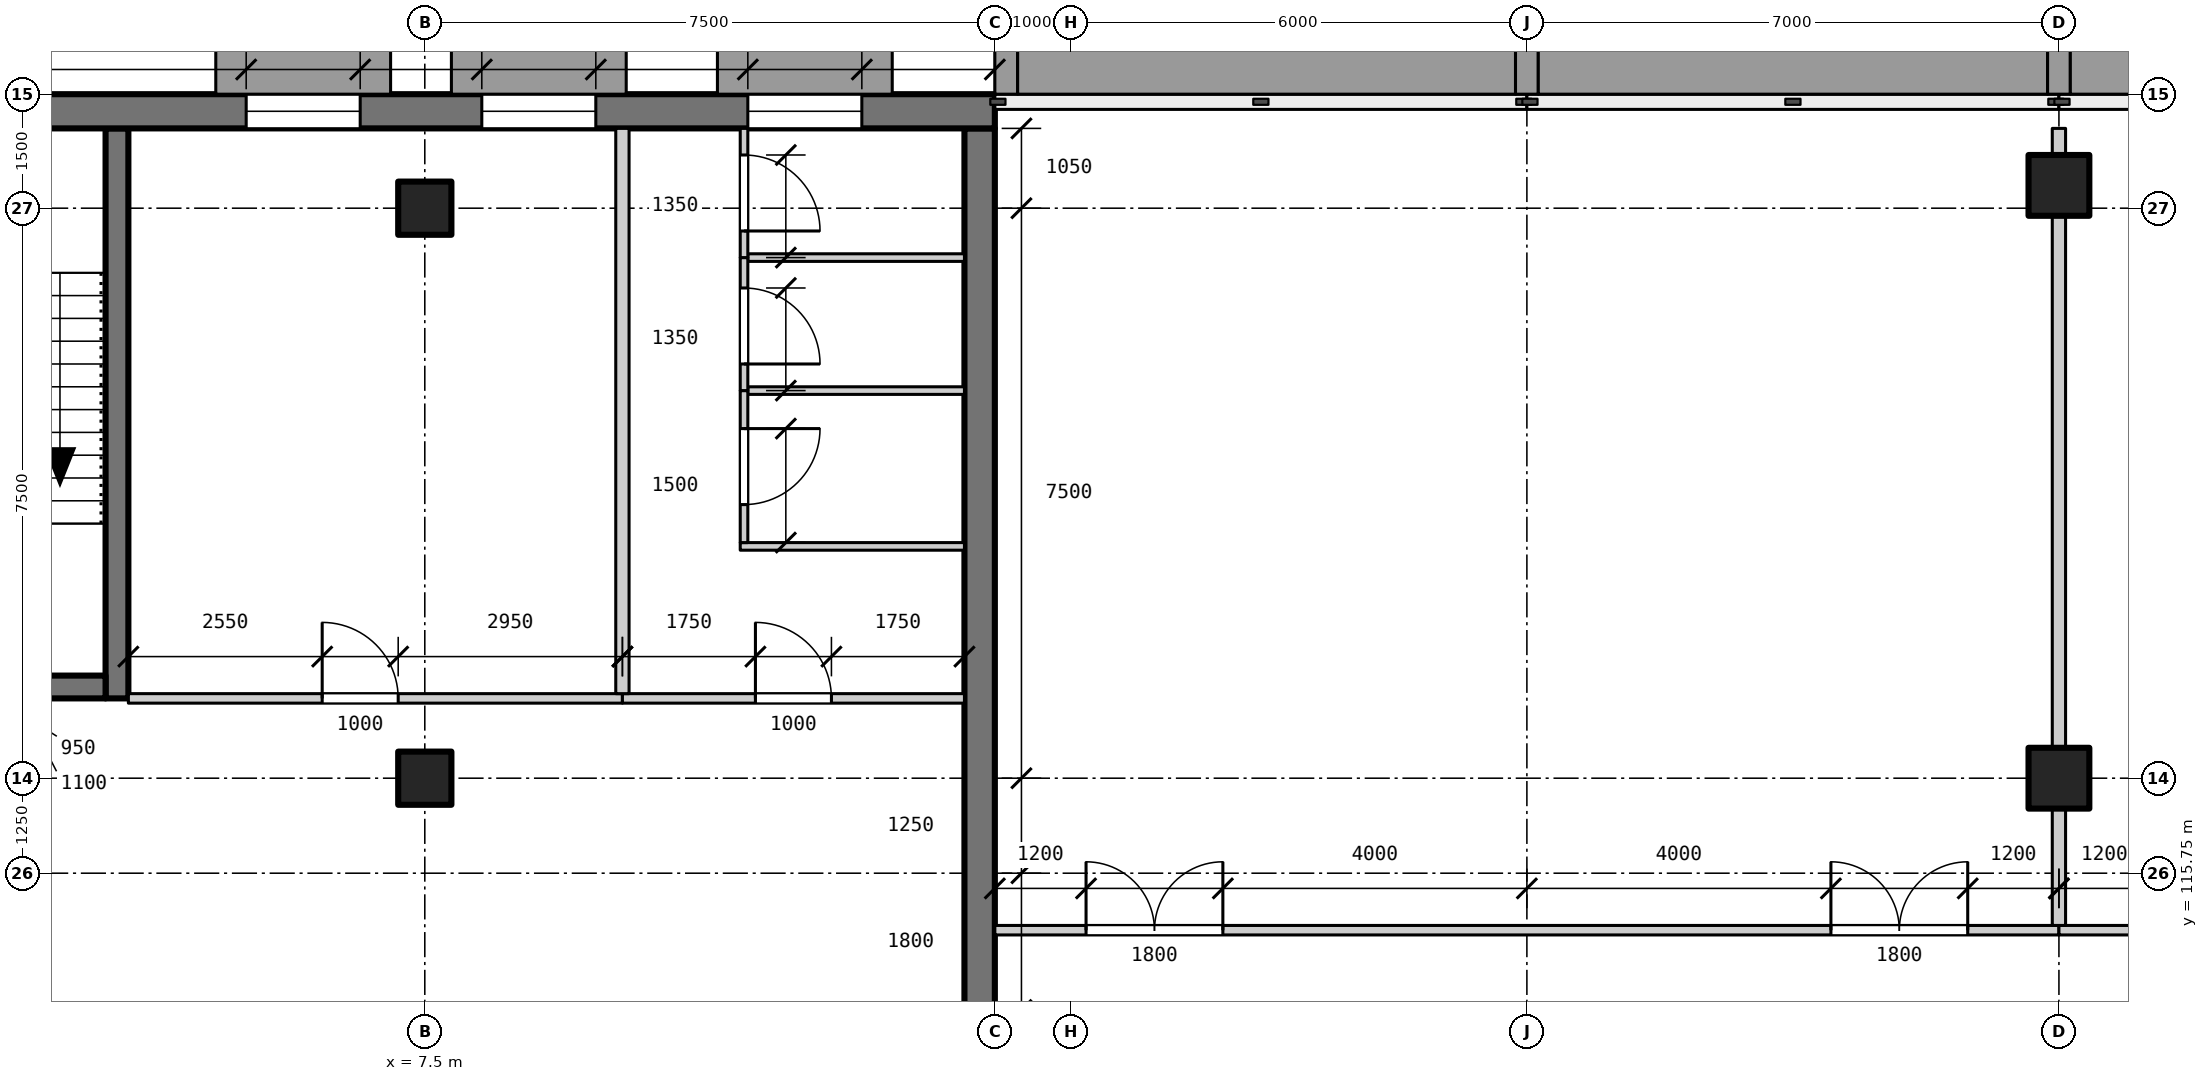
"""IFC4 building model, lengths in metres.
Left out: names, types, materials, properties, quantities, classifications, styles, units other than length and angle.
Written with IfcOpenShell. Run it as: python <this file> out.ifc"""

import sys

from ifc_helpers import new_model, si_unit, direction, frame, frame_2d, origin, origin_2d, place, context, subcontext, project, spatial, rectangle, extrude, element, fill, save


model = new_model("IFC4")
c1 = context("Model", 3, precision=1e-05, world=origin(), true_north=direction((0.0, 1.0)))
c2 = subcontext(c1, "Body", "Model", "MODEL_VIEW")
j1 = project(units=[si_unit("LENGTHUNIT", "METRE"), si_unit("PLANEANGLEUNIT", "RADIAN")], contexts=[c1])
p1 = place(None, origin())
s1 = spatial("IfcSite", under=j1, at=p1, CompositionType="ELEMENT")
p2 = place(p1, origin())
s2 = spatial("IfcBuilding", under=s1, at=p2, CompositionType="ELEMENT")
p3 = place(p2, frame((0.0, 0.0, 6.0)))
s3 = spatial("IfcBuildingStorey", under=s2, at=p3, CompositionType="ELEMENT", Elevation=6.0)
for number, where, z_axis, x_axis in (
    (1, (7.5, 117.0, 0.0), (0.0, 0.0, 1.0), (1.0, 0.0, 0.0)),
    (2, (7.5, 124.5, 0.0), (0.0, 0.0, 1.0), (1.0, 0.0, 0.0)),
):
    element("IfcColumn", number, at=place(p3, frame(where, z_axis=z_axis, x_axis=x_axis)), inside=s3, PredefinedType="COLUMN", context=c2, shape_type="SweptSolid", body=[
        extrude(rectangle(XDim=0.7, YDim=0.7, at=origin_2d()), origin(), (0.0, 0.0, 1.0), 3.9),
    ])
for number, where, z_axis, x_axis in (
    (3, (29.0, 117.0, 0.0), (0.0, 0.0, 1.0), (1.0, 0.0, 0.0)),
    (4, (29.0, 124.8, 0.0), (0.0, 0.0, 1.0), (1.0, 0.0, 0.0)),
):
    element("IfcColumn", number, at=place(p3, frame(where, z_axis=z_axis, x_axis=x_axis)), inside=s3, PredefinedType="COLUMN", context=c2, shape_type="SweptSolid", body=[
        extrude(rectangle(XDim=0.8, YDim=0.8, at=origin_2d()), origin(), (0.0, 0.0, 1.0), 3.9),
    ])
p4 = place(p3, frame((14.8, 99.0, 0.0), z_axis=(0.0, 0.0, 1.0), x_axis=(0.0, 1.0, 0.0)))
e5 = element("IfcWall", 5, at=p4, inside=s3, PredefinedType="SHEAR", context=c2, shape_type="SweptSolid", body=[
    extrude(rectangle(XDim=26.55, YDim=0.4, at=frame_2d((13.275, 0.0))), origin(), (0.0, 0.0, 1.0), 4.2),
])
p5 = place(p4, frame((13.55, 0.0, 0.0)))
e6 = element("IfcOpeningElement", 6, at=p5, cuts=e5, PredefinedType="OPENING", context=c2, shape_type="SweptSolid", body=[
    extrude(rectangle(XDim=1.4, YDim=2.4, at=frame_2d((0.7, 1.2))), frame((0.0, 0.21, 0.0), z_axis=(0.0, -1.0, 0.0), x_axis=(1.0, 0.0, 0.0)), (0.0, 0.0, 1.0), 0.42),
])
p6 = place(p3, frame((3.45, 118.05, 0.0), z_axis=(0.0, 0.0, 1.0), x_axis=(0.0, 1.0, 0.0)))
e7 = element("IfcWall", 7, at=p6, inside=s3, PredefinedType="SHEAR", context=c2, shape_type="SweptSolid", body=[
    extrude(rectangle(XDim=7.5, YDim=0.3, at=frame_2d((3.75, 0.0))), origin(), (0.0, 0.0, 1.0), 4.2),
])
p7 = place(p3, frame((0.3, 118.2, 0.0), z_axis=(0.0, 0.0, 1.0), x_axis=(1.0, 0.0, 0.0)))
e8 = element("IfcWall", 8, at=p7, inside=s3, PredefinedType="SHEAR", context=c2, shape_type="SweptSolid", body=[
    extrude(rectangle(XDim=3.0, YDim=0.3, at=frame_2d((1.5, 0.0))), origin(), (0.0, 0.0, 1.0), 4.2),
])
p8 = place(p7, frame((0.95, 0.0, 0.0)))
e9 = element("IfcOpeningElement", 9, at=p8, cuts=e8, PredefinedType="OPENING", context=c2, shape_type="SweptSolid", body=[
    extrude(rectangle(XDim=1.1, YDim=2.1, at=frame_2d((0.55, 1.05))), frame((0.0, 0.16, 0.0), z_axis=(0.0, -1.0, 0.0), x_axis=(1.0, 0.0, 0.0)), (0.0, 0.0, 1.0), 0.32),
])
p9 = place(p3, frame((0.3, 125.775, 0.0), z_axis=(0.0, 0.0, 1.0), x_axis=(1.0, 0.0, 0.0)))
e10 = element("IfcWall", 10, at=p9, inside=s3, PredefinedType="SOLIDWALL", context=c2, shape_type="SweptSolid", body=[
    extrude(rectangle(XDim=14.7, YDim=0.45, at=frame_2d((7.35, 0.0))), origin(), (0.0, 0.0, 1.0), 3.9),
])
p10 = place(p9, frame((4.85, 0.0, 0.8)))
e11 = element("IfcOpeningElement", 11, at=p10, cuts=e10, PredefinedType="OPENING", context=c2, shape_type="SweptSolid", body=[
    extrude(rectangle(XDim=1.5, YDim=2.2, at=frame_2d((0.75, 1.1))), frame((0.0, 0.235, 0.0), z_axis=(0.0, -1.0, 0.0), x_axis=(1.0, 0.0, 0.0)), (0.0, 0.0, 1.0), 0.47),
])
p11 = place(p9, frame((7.95, 0.0, 0.8)))
e12 = element("IfcOpeningElement", 12, at=p11, cuts=e10, PredefinedType="OPENING", context=c2, shape_type="SweptSolid", body=[
    extrude(rectangle(XDim=1.5, YDim=2.2, at=frame_2d((0.75, 1.1))), frame((0.0, 0.235, 0.0), z_axis=(0.0, -1.0, 0.0), x_axis=(1.0, 0.0, 0.0)), (0.0, 0.0, 1.0), 0.47),
])
p12 = place(p9, frame((11.45, 0.0, 0.8)))
e13 = element("IfcOpeningElement", 13, at=p12, cuts=e10, PredefinedType="OPENING", context=c2, shape_type="SweptSolid", body=[
    extrude(rectangle(XDim=1.5, YDim=2.2, at=frame_2d((0.75, 1.1))), frame((0.0, 0.235, 0.0), z_axis=(0.0, -1.0, 0.0), x_axis=(1.0, 0.0, 0.0)), (0.0, 0.0, 1.0), 0.47),
])
p13 = place(p3, frame((15.0, 115.0, 0.0), z_axis=(0.0, 0.0, 1.0), x_axis=(1.0, 0.0, 0.0)))
e14 = element("IfcWall", 14, at=p13, inside=s3, PredefinedType="PARTITIONING", context=c2, shape_type="SweptSolid", body=[
    extrude(rectangle(XDim=14.0, YDim=0.125, at=frame_2d((7.0, 0.0))), origin(), (0.0, 0.0, 1.0), 3.9),
])
p14 = place(p13, frame((1.2, 0.0, 0.0)))
e15 = element("IfcOpeningElement", 15, at=p14, cuts=e14, PredefinedType="OPENING", context=c2, shape_type="SweptSolid", body=[
    extrude(rectangle(XDim=1.8, YDim=2.1, at=frame_2d((0.9, 1.05))), frame((0.0, 0.073, 0.0), z_axis=(0.0, -1.0, 0.0), x_axis=(1.0, 0.0, 0.0)), (0.0, 0.0, 1.0), 0.145),
])
p15 = place(p13, frame((11.0, 0.0, 0.0)))
e16 = element("IfcOpeningElement", 16, at=p15, cuts=e14, PredefinedType="OPENING", context=c2, shape_type="SweptSolid", body=[
    extrude(rectangle(XDim=1.8, YDim=2.1, at=frame_2d((0.9, 1.05))), frame((0.0, 0.073, 0.0), z_axis=(0.0, -1.0, 0.0), x_axis=(1.0, 0.0, 0.0)), (0.0, 0.0, 1.0), 0.145),
])
p16 = place(p3, frame((29.0, 115.0, 0.0), z_axis=(0.0, 0.0, 1.0), x_axis=(1.0, 0.0, 0.0)))
e17 = element("IfcWall", 17, at=p16, inside=s3, PredefinedType="PARTITIONING", context=c2, shape_type="SweptSolid", body=[
    extrude(rectangle(XDim=14.0, YDim=0.125, at=frame_2d((7.0, 0.0))), origin(), (0.0, 0.0, 1.0), 3.9),
])
p17 = place(p16, frame((1.2, 0.0, 0.0)))
e18 = element("IfcOpeningElement", 18, at=p17, cuts=e17, PredefinedType="OPENING", context=c2, shape_type="SweptSolid", body=[
    extrude(rectangle(XDim=1.8, YDim=2.1, at=frame_2d((0.9, 1.05))), frame((0.0, 0.073, 0.0), z_axis=(0.0, -1.0, 0.0), x_axis=(1.0, 0.0, 0.0)), (0.0, 0.0, 1.0), 0.145),
])
p18 = place(p16, frame((11.0, 0.0, 0.0)))
e19 = element("IfcOpeningElement", 19, at=p18, cuts=e17, PredefinedType="OPENING", context=c2, shape_type="SweptSolid", body=[
    extrude(rectangle(XDim=1.8, YDim=2.1, at=frame_2d((0.9, 1.05))), frame((0.0, 0.073, 0.0), z_axis=(0.0, -1.0, 0.0), x_axis=(1.0, 0.0, 0.0)), (0.0, 0.0, 1.0), 0.145),
])
p19 = place(p3, frame((3.6, 118.05, 0.0), z_axis=(0.0, 0.0, 1.0), x_axis=(1.0, 0.0, 0.0)))
e20 = element("IfcWall", 20, at=p19, inside=s3, PredefinedType="PARTITIONING", context=c2, shape_type="SweptSolid", body=[
    extrude(rectangle(XDim=6.5, YDim=0.125, at=frame_2d((3.25, 0.0))), origin(), (0.0, 0.0, 1.0), 3.9),
])
p20 = place(p19, frame((2.55, 0.0, 0.0)))
e21 = element("IfcOpeningElement", 21, at=p20, cuts=e20, PredefinedType="OPENING", context=c2, shape_type="SweptSolid", body=[
    extrude(rectangle(XDim=1.0, YDim=2.1, at=frame_2d((0.5, 1.05))), frame((0.0, 0.073, 0.0), z_axis=(0.0, -1.0, 0.0), x_axis=(1.0, 0.0, 0.0)), (0.0, 0.0, 1.0), 0.145),
])
p21 = place(p3, frame((10.1, 118.05, 0.0), z_axis=(0.0, 0.0, 1.0), x_axis=(1.0, 0.0, 0.0)))
e22 = element("IfcWall", 22, at=p21, inside=s3, PredefinedType="PARTITIONING", context=c2, shape_type="SweptSolid", body=[
    extrude(rectangle(XDim=4.5, YDim=0.125, at=frame_2d((2.25, 0.0))), origin(), (0.0, 0.0, 1.0), 3.9),
])
p22 = place(p21, frame((1.75, 0.0, 0.0)))
e23 = element("IfcOpeningElement", 23, at=p22, cuts=e22, PredefinedType="OPENING", context=c2, shape_type="SweptSolid", body=[
    extrude(rectangle(XDim=1.0, YDim=2.1, at=frame_2d((0.5, 1.05))), frame((0.0, 0.073, 0.0), z_axis=(0.0, -1.0, 0.0), x_axis=(1.0, 0.0, 0.0)), (0.0, 0.0, 1.0), 0.145),
])
p23 = place(p3, frame((11.65, 120.05, 0.0), z_axis=(0.0, 0.0, 1.0), x_axis=(1.0, 0.0, 0.0)))
e24 = element("IfcWall", 24, at=p23, inside=s3, PredefinedType="PARTITIONING", context=c2, shape_type="SweptSolid", body=[
    extrude(rectangle(XDim=2.95, YDim=0.1, at=frame_2d((1.475, 0.0))), origin(), (0.0, 0.0, 1.0), 3.9),
])
for number, where, z_axis, x_axis in (
    (25, (11.75, 122.1, 0.0), (0.0, 0.0, 1.0), (1.0, 0.0, 0.0)),
    (26, (11.75, 123.85, 0.0), (0.0, 0.0, 1.0), (1.0, 0.0, 0.0)),
):
    element("IfcWall", number, at=place(p3, frame(where, z_axis=z_axis, x_axis=x_axis)), inside=s3, PredefinedType="PARTITIONING", context=c2, shape_type="SweptSolid", body=[
        extrude(rectangle(XDim=2.85, YDim=0.1, at=frame_2d((1.425, 0.0))), origin(), (0.0, 0.0, 1.0), 3.9),
    ])
p24 = place(p3, frame((10.1, 118.113, 0.0), z_axis=(0.0, 0.0, 1.0), x_axis=(0.0, 1.0, 0.0)))
e27 = element("IfcWall", 27, at=p24, inside=s3, PredefinedType="PARTITIONING", context=c2, shape_type="SweptSolid", body=[
    extrude(rectangle(XDim=7.438, YDim=0.175, at=frame_2d((3.719, 0.0))), origin(), (0.0, 0.0, 1.0), 3.9),
])
p25 = place(p3, frame((11.7, 120.1, 0.0), z_axis=(0.0, 0.0, 1.0), x_axis=(0.0, 1.0, 0.0)))
e28 = element("IfcWall", 28, at=p25, inside=s3, PredefinedType="PARTITIONING", context=c2, shape_type="SweptSolid", body=[
    extrude(rectangle(XDim=2.0, YDim=0.1, at=frame_2d((1.0, 0.0))), origin(), (0.0, 0.0, 1.0), 3.9),
])
p26 = place(p25, frame((0.5, 0.0, 0.0)))
e29 = element("IfcOpeningElement", 29, at=p26, cuts=e28, PredefinedType="OPENING", context=c2, shape_type="SweptSolid", body=[
    extrude(rectangle(XDim=1.0, YDim=2.1, at=frame_2d((0.5, 1.05))), frame((0.0, 0.06, 0.0), z_axis=(0.0, -1.0, 0.0), x_axis=(1.0, 0.0, 0.0)), (0.0, 0.0, 1.0), 0.12),
])
p27 = place(p3, frame((11.7, 122.1, 0.0), z_axis=(0.0, 0.0, 1.0), x_axis=(0.0, 1.0, 0.0)))
e30 = element("IfcWall", 30, at=p27, inside=s3, PredefinedType="PARTITIONING", context=c2, shape_type="SweptSolid", body=[
    extrude(rectangle(XDim=1.75, YDim=0.1, at=frame_2d((0.875, 0.0))), origin(), (0.0, 0.0, 1.0), 3.9),
])
p28 = place(p27, frame((0.35, 0.0, 0.0)))
e31 = element("IfcOpeningElement", 31, at=p28, cuts=e30, PredefinedType="OPENING", context=c2, shape_type="SweptSolid", body=[
    extrude(rectangle(XDim=1.0, YDim=2.1, at=frame_2d((0.5, 1.05))), frame((0.0, 0.06, 0.0), z_axis=(0.0, -1.0, 0.0), x_axis=(1.0, 0.0, 0.0)), (0.0, 0.0, 1.0), 0.12),
])
p29 = place(p3, frame((11.7, 123.85, 0.0), z_axis=(0.0, 0.0, 1.0), x_axis=(0.0, 1.0, 0.0)))
e32 = element("IfcWall", 32, at=p29, inside=s3, PredefinedType="PARTITIONING", context=c2, shape_type="SweptSolid", body=[
    extrude(rectangle(XDim=1.7, YDim=0.1, at=frame_2d((0.85, 0.0))), origin(), (0.0, 0.0, 1.0), 3.9),
])
p30 = place(p29, frame((0.35, 0.0, 0.0)))
e33 = element("IfcOpeningElement", 33, at=p30, cuts=e32, PredefinedType="OPENING", context=c2, shape_type="SweptSolid", body=[
    extrude(rectangle(XDim=1.0, YDim=2.1, at=frame_2d((0.5, 1.05))), frame((0.0, 0.06, 0.0), z_axis=(0.0, -1.0, 0.0), x_axis=(1.0, 0.0, 0.0)), (0.0, 0.0, 1.0), 0.12),
])
p31 = place(p3, frame((29.0, 115.062, 0.0), z_axis=(0.0, 0.0, 1.0), x_axis=(0.0, 1.0, 0.0)))
e34 = element("IfcWall", 34, at=p31, inside=s3, PredefinedType="PARTITIONING", context=c2, shape_type="SweptSolid", body=[
    extrude(rectangle(XDim=1.538, YDim=0.175, at=frame_2d((0.769, 0.0))), origin(), (0.0, 0.0, 1.0), 2.9),
])
p32 = place(p3, frame((29.0, 117.4, 0.0), z_axis=(0.0, 0.0, 1.0), x_axis=(0.0, 1.0, 0.0)))
e35 = element("IfcWall", 35, at=p32, inside=s3, PredefinedType="PARTITIONING", context=c2, shape_type="SweptSolid", body=[
    extrude(rectangle(XDim=7.0, YDim=0.175, at=frame_2d((3.5, 0.0))), origin(), (0.0, 0.0, 1.0), 2.9),
])
p33 = place(p3, frame((29.0, 125.2, 0.0), z_axis=(0.0, 0.0, 1.0), x_axis=(0.0, 1.0, 0.0)))
e36 = element("IfcWall", 36, at=p33, inside=s3, PredefinedType="PARTITIONING", context=c2, shape_type="SweptSolid", body=[
    extrude(rectangle(XDim=0.35, YDim=0.175, at=frame_2d((0.175, 0.0))), origin(), (0.0, 0.0, 1.0), 3.9),
])
p34 = place(p10, origin())
e37 = element("IfcWindow", 37, at=p34, inside=s3, PartitioningType="SINGLE_PANEL", PredefinedType="WINDOW", context=c2, shape_type="SweptSolid", body=[
    extrude(rectangle(XDim=1.5, YDim=2.2, at=frame_2d((0.75, 1.1))), frame((0.0, -0.075, 0.0), z_axis=(0.0, -1.0, 0.0), x_axis=(1.0, 0.0, 0.0)), (0.0, 0.0, 1.0), 0.06),
])
fill(e11, e37)
p35 = place(p11, origin())
e38 = element("IfcWindow", 38, at=p35, inside=s3, PartitioningType="SINGLE_PANEL", PredefinedType="WINDOW", context=c2, shape_type="SweptSolid", body=[
    extrude(rectangle(XDim=1.5, YDim=2.2, at=frame_2d((0.75, 1.1))), frame((0.0, -0.075, 0.0), z_axis=(0.0, -1.0, 0.0), x_axis=(1.0, 0.0, 0.0)), (0.0, 0.0, 1.0), 0.06),
])
fill(e12, e38)
p36 = place(p12, origin())
e39 = element("IfcWindow", 39, at=p36, inside=s3, PartitioningType="SINGLE_PANEL", PredefinedType="WINDOW", context=c2, shape_type="SweptSolid", body=[
    extrude(rectangle(XDim=1.5, YDim=2.2, at=frame_2d((0.75, 1.1))), frame((0.0, -0.075, 0.0), z_axis=(0.0, -1.0, 0.0), x_axis=(1.0, 0.0, 0.0)), (0.0, 0.0, 1.0), 0.06),
])
fill(e13, e39)
p37 = place(p14, origin())
e40 = element("IfcDoor", 40, at=p37, inside=s3, OperationType="DOUBLE_DOOR_SINGLE_SWING", PredefinedType="DOOR", context=c2, shape_type="SweptSolid", body=[
    extrude(rectangle(XDim=1.8, YDim=2.1, at=frame_2d((0.9, 1.05))), frame((0.0, 0.025, 0.0), z_axis=(0.0, -1.0, 0.0), x_axis=(1.0, 0.0, 0.0)), (0.0, 0.0, 1.0), 0.05),
])
fill(e15, e40)
p38 = place(p15, origin())
e41 = element("IfcDoor", 41, at=p38, inside=s3, OperationType="DOUBLE_DOOR_SINGLE_SWING", PredefinedType="DOOR", context=c2, shape_type="SweptSolid", body=[
    extrude(rectangle(XDim=1.8, YDim=2.1, at=frame_2d((0.9, 1.05))), frame((0.0, 0.025, 0.0), z_axis=(0.0, -1.0, 0.0), x_axis=(1.0, 0.0, 0.0)), (0.0, 0.0, 1.0), 0.05),
])
fill(e16, e41)
p39 = place(p20, origin())
e42 = element("IfcDoor", 42, at=p39, inside=s3, OperationType="SINGLE_SWING_LEFT", PredefinedType="DOOR", context=c2, shape_type="SweptSolid", body=[
    extrude(rectangle(XDim=1.0, YDim=2.1, at=frame_2d((0.5, 1.05))), frame((0.0, 0.025, 0.0), z_axis=(0.0, -1.0, 0.0), x_axis=(1.0, 0.0, 0.0)), (0.0, 0.0, 1.0), 0.05),
])
fill(e21, e42)
p40 = place(p22, origin())
e43 = element("IfcDoor", 43, at=p40, inside=s3, OperationType="SINGLE_SWING_LEFT", PredefinedType="DOOR", context=c2, shape_type="SweptSolid", body=[
    extrude(rectangle(XDim=1.0, YDim=2.1, at=frame_2d((0.5, 1.05))), frame((0.0, 0.025, 0.0), z_axis=(0.0, -1.0, 0.0), x_axis=(1.0, 0.0, 0.0)), (0.0, 0.0, 1.0), 0.05),
])
fill(e23, e43)
p41 = place(p26, frame((1.0, 0.0, 0.0), z_axis=(0.0, 0.0, 1.0), x_axis=(-1.0, 0.0, 0.0)))
e44 = element("IfcDoor", 44, at=p41, inside=s3, OperationType="SINGLE_SWING_LEFT", PredefinedType="DOOR", context=c2, shape_type="SweptSolid", body=[
    extrude(rectangle(XDim=1.0, YDim=2.1, at=frame_2d((0.5, 1.05))), frame((0.0, 0.025, 0.0), z_axis=(0.0, -1.0, 0.0), x_axis=(1.0, 0.0, 0.0)), (0.0, 0.0, 1.0), 0.05),
])
fill(e29, e44)
p42 = place(p28, frame((1.0, 0.0, 0.0), z_axis=(0.0, 0.0, 1.0), x_axis=(-1.0, 0.0, 0.0)))
e45 = element("IfcDoor", 45, at=p42, inside=s3, OperationType="SINGLE_SWING_RIGHT", PredefinedType="DOOR", context=c2, shape_type="SweptSolid", body=[
    extrude(rectangle(XDim=1.0, YDim=2.1, at=frame_2d((0.5, 1.05))), frame((0.0, 0.025, 0.0), z_axis=(0.0, -1.0, 0.0), x_axis=(1.0, 0.0, 0.0)), (0.0, 0.0, 1.0), 0.05),
])
fill(e31, e45)
p43 = place(p30, frame((1.0, 0.0, 0.0), z_axis=(0.0, 0.0, 1.0), x_axis=(-1.0, 0.0, 0.0)))
e46 = element("IfcDoor", 46, at=p43, inside=s3, OperationType="SINGLE_SWING_RIGHT", PredefinedType="DOOR", context=c2, shape_type="SweptSolid", body=[
    extrude(rectangle(XDim=1.0, YDim=2.1, at=frame_2d((0.5, 1.05))), frame((0.0, 0.025, 0.0), z_axis=(0.0, -1.0, 0.0), x_axis=(1.0, 0.0, 0.0)), (0.0, 0.0, 1.0), 0.05),
])
fill(e33, e46)
save(model, sys.argv[1])
